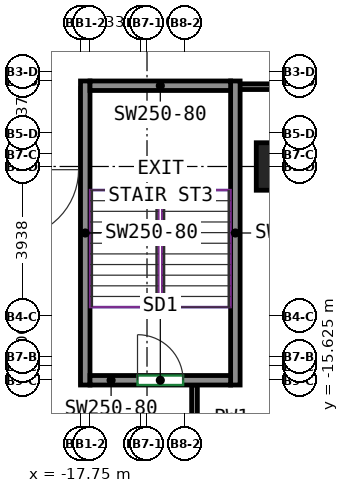
"""IFC4 building model, lengths in metres.
Left out: names, types, materials, properties, quantities, classifications, styles, units other than length and angle.
Written with IfcOpenShell. Run it as: python <this file> out.ifc"""

import sys

from ifc_helpers import new_model, si_unit, direction, frame, frame_2d, origin, origin_2d, place, context, subcontext, project, spatial, rectangle, extrude, source, transform, mapped, element, fill, save


model = new_model("IFC4")
c1 = context("Model", 3, precision=1e-05, world=origin(), true_north=direction((0.0, 1.0)))
c2 = subcontext(c1, "Body", "Model", "MODEL_VIEW")
j1 = project(units=[si_unit("LENGTHUNIT", "METRE"), si_unit("PLANEANGLEUNIT", "RADIAN")], contexts=[c1])
p1 = place(None, origin())
s1 = spatial("IfcSite", under=j1, at=p1, CompositionType="ELEMENT")
p2 = place(p1, origin())
s2 = spatial("IfcBuilding", under=s1, at=p2, CompositionType="ELEMENT")
p3 = place(p2, frame((0.0, 0.0, 67.2)))
s3 = spatial("IfcBuildingStorey", under=s2, at=p3, CompositionType="ELEMENT", Elevation=67.2)
m1 = source(origin(), c2, "Body", "SweptSolid", [
    extrude(rectangle(XDim=1.25, YDim=1.25, at=origin_2d()), origin(), (0.0, 0.0, 1.0), 3.72),
])
p4 = place(p3, frame((-12.5, -10.0, 0.0), z_axis=(0.0, 0.0, 1.0), x_axis=(1.0, 0.0, 0.0)))
e1 = element("IfcColumn", 1, at=p4, inside=s3, PredefinedType="COLUMN", context=c2, shape_type="MappedRepresentation", body=[
    mapped(m1, transform((0.0, 0.0, 0.0))),
])
m2 = source(origin(), c2, "Body", "SweptSolid", [
    extrude(rectangle(XDim=8.0, YDim=0.25, at=frame_2d((4.0, 0.0))), origin(), (0.0, 0.0, 1.0), 3.72),
])
for number, where, z_axis, x_axis in (
    (2, (-17.625, -15.75, 0.0), (0.0, 0.0, 1.0), (0.0, 1.0, 0.0)),
    (3, (-13.675, -15.75, 0.0), (0.0, 0.0, 1.0), (0.0, 1.0, 0.0)),
):
    element("IfcWall", number, at=place(p3, frame(where, z_axis=z_axis, x_axis=x_axis)), inside=s3, PredefinedType="SHEAR", context=c2, shape_type="MappedRepresentation", body=[
        mapped(m2, transform((0.0, 0.0, 0.0))),
    ])
m3 = source(origin(), c2, "Body", "SweptSolid", [
    extrude(rectangle(XDim=3.7, YDim=0.25, at=frame_2d((1.85, 0.0))), origin(), (0.0, 0.0, 1.0), 3.72),
])
p5 = place(p3, frame((-17.5, -15.625, 0.0), z_axis=(0.0, 0.0, 1.0), x_axis=(1.0, 0.0, 0.0)))
e4 = element("IfcWall", 4, at=p5, inside=s3, PredefinedType="SHEAR", context=c2, shape_type="MappedRepresentation", body=[
    mapped(m3, transform((0.0, 0.0, 0.0))),
])
p6 = place(p5, frame((1.25, 0.0, 0.0)))
e5 = element("IfcOpeningElement", 5, at=p6, cuts=e4, PredefinedType="OPENING", context=c2, shape_type="SweptSolid", body=[
    extrude(rectangle(XDim=1.2, YDim=2.1, at=frame_2d((0.6, 1.05))), frame((0.0, 0.135, 0.0), z_axis=(0.0, -1.0, 0.0), x_axis=(1.0, 0.0, 0.0)), (0.0, 0.0, 1.0), 0.27),
])
p7 = place(p3, frame((-17.5, -7.875, 0.0), z_axis=(0.0, 0.0, 1.0), x_axis=(1.0, 0.0, 0.0)))
e6 = element("IfcWall", 6, at=p7, inside=s3, PredefinedType="SHEAR", context=c2, shape_type="MappedRepresentation", body=[
    mapped(m3, transform((0.0, 0.0, 0.0))),
])
p8 = place(p3, frame((-13.6, -7.9, 0.0), z_axis=(0.0, 0.0, 1.0), x_axis=(1.0, 0.0, 0.0)))
e7 = element("IfcWall", 7, at=p8, inside=s3, PredefinedType="PARTITIONING", context=c2, shape_type="SweptSolid", body=[
    extrude(rectangle(XDim=31.4, YDim=0.15, at=frame_2d((15.7, 0.0))), origin(), (0.0, 0.0, 1.0), 3.72),
])
p9 = place(p8, frame((11.501, 0.0, 0.0)))
e8 = element("IfcOpeningElement", 8, at=p9, cuts=e7, PredefinedType="OPENING", context=c2, shape_type="SweptSolid", body=[
    extrude(rectangle(XDim=0.9, YDim=2.1, at=frame_2d((0.45, 1.05))), frame((0.0, 0.085, 0.0), z_axis=(0.0, -1.0, 0.0), x_axis=(1.0, 0.0, 0.0)), (0.0, 0.0, 1.0), 0.17),
])
p10 = place(p8, frame((19.003, 0.0, 0.0)))
e9 = element("IfcOpeningElement", 9, at=p10, cuts=e7, PredefinedType="OPENING", context=c2, shape_type="SweptSolid", body=[
    extrude(rectangle(XDim=0.9, YDim=2.1, at=frame_2d((0.45, 1.05))), frame((0.0, 0.085, 0.0), z_axis=(0.0, -1.0, 0.0), x_axis=(1.0, 0.0, 0.0)), (0.0, 0.0, 1.0), 0.17),
])
p11 = place(p8, frame((23.291, 0.0, 0.0)))
e10 = element("IfcOpeningElement", 10, at=p11, cuts=e7, PredefinedType="OPENING", context=c2, shape_type="SweptSolid", body=[
    extrude(rectangle(XDim=0.9, YDim=2.1, at=frame_2d((0.45, 1.05))), frame((0.0, 0.085, 0.0), z_axis=(0.0, -1.0, 0.0), x_axis=(1.0, 0.0, 0.0)), (0.0, 0.0, 1.0), 0.17),
])
p12 = place(p3, frame((-14.75, -17.475, 0.0), z_axis=(0.0, 0.0, 1.0), x_axis=(0.0, 1.0, 0.0)))
e11 = element("IfcWall", 11, at=p12, inside=s3, PredefinedType="PARTITIONING", context=c2, shape_type="SweptSolid", body=[
    extrude(rectangle(XDim=1.725, YDim=0.15, at=frame_2d((0.863, 0.0))), origin(), (0.0, 0.0, 1.0), 3.72),
])
p13 = place(p6, origin())
e12 = element("IfcDoor", 12, at=p13, inside=s3, OperationType="DOUBLE_DOOR_SINGLE_SWING", PredefinedType="DOOR", context=c2, shape_type="SweptSolid", body=[
    extrude(rectangle(XDim=1.2, YDim=2.1, at=frame_2d((0.6, 1.05))), frame((0.0, 0.025, 0.0), z_axis=(0.0, -1.0, 0.0), x_axis=(1.0, 0.0, 0.0)), (0.0, 0.0, 1.0), 0.05),
])
fill(e5, e12)
save(model, sys.argv[1])
